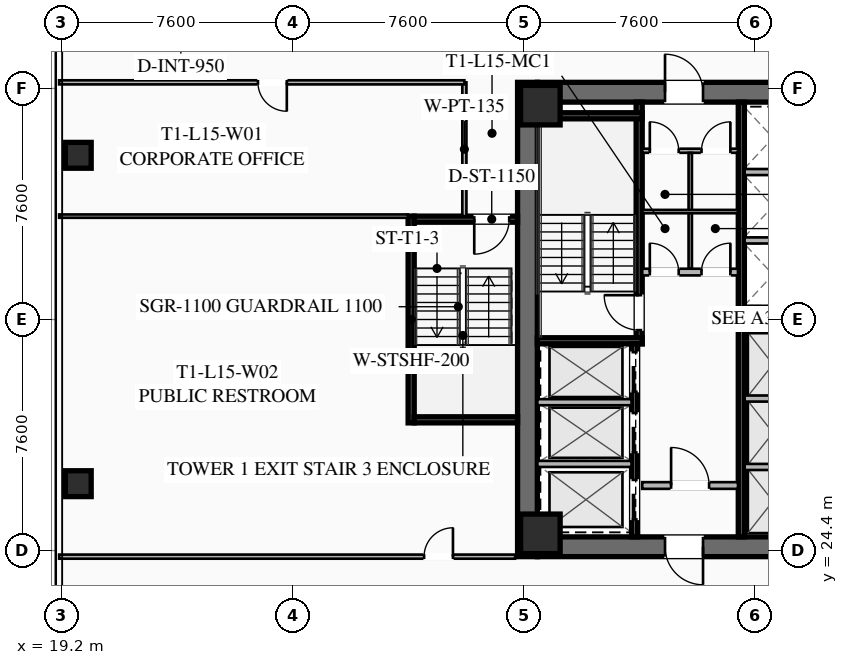
"""IFC4 building model, lengths in metres.
Left out: names, types, materials, properties, quantities, classifications, styles, units other than length and angle.
Written with IfcOpenShell. Run it as: python <this file> out.ifc"""

import sys

from ifc_helpers import new_model, si_unit, direction, frame, frame_2d, origin, origin_2d, place, context, subcontext, project, spatial, rectangle, hollow_rectangle, extrude, element, fill, save


model = new_model("IFC4")
c1 = context("Model", 3, precision=1e-05, world=origin(), true_north=direction((0.0, 1.0)))
c2 = subcontext(c1, "Body", "Model", "MODEL_VIEW")
j1 = project(units=[si_unit("LENGTHUNIT", "METRE"), si_unit("PLANEANGLEUNIT", "RADIAN")], contexts=[c1])
p1 = place(None, origin())
s1 = spatial("IfcSite", under=j1, at=p1, CompositionType="ELEMENT")
p2 = place(p1, origin())
s2 = spatial("IfcBuilding", under=s1, at=p2, CompositionType="ELEMENT")
p3 = place(p2, frame((0.0, 0.0, 60.1)))
s3 = spatial("IfcBuildingStorey", under=s2, at=p3, CompositionType="ELEMENT", Elevation=60.1)
p4 = place(p3, frame((34.525, 24.2, 0.0), z_axis=(0.0, 0.0, 1.0), x_axis=(0.0, 1.0, 0.0)))
e1 = element("IfcWall", 1, at=p4, inside=s3, PredefinedType="SHEAR", context=c2, shape_type="SweptSolid", body=[
    extrude(rectangle(XDim=15.6, YDim=0.65, at=frame_2d((7.8, 0.0))), origin(), (0.0, 0.0, 1.0), 3.55),
])
p5 = place(p3, frame((49.15, 24.525, 0.0), z_axis=(0.0, 0.0, 1.0), x_axis=(-1.0, 0.0, 0.0)))
e2 = element("IfcWall", 2, at=p5, inside=s3, PredefinedType="SHEAR", context=c2, shape_type="SweptSolid", body=[
    extrude(rectangle(XDim=14.3, YDim=0.65, at=frame_2d((7.15, 0.0))), origin(), (0.0, 0.0, 1.0), 3.55),
])
p6 = place(p5, frame((8.85, 0.0, 0.0)))
e3 = element("IfcOpeningElement", 3, at=p6, cuts=e2, PredefinedType="OPENING", context=c2, shape_type="SweptSolid", body=[
    extrude(rectangle(XDim=1.25, YDim=2.25, at=frame_2d((0.625, 1.125))), frame((0.0, 0.335, 0.0), z_axis=(0.0, -1.0, 0.0), x_axis=(1.0, 0.0, 0.0)), (0.0, 0.0, 1.0), 0.67),
])
p7 = place(p5, frame((3.8, 0.0, 0.0)))
e4 = element("IfcOpeningElement", 4, at=p7, cuts=e2, PredefinedType="OPENING", context=c2, shape_type="SweptSolid", body=[
    extrude(rectangle(XDim=1.25, YDim=2.25, at=frame_2d((0.625, 1.125))), frame((0.0, 0.335, 0.0), z_axis=(0.0, -1.0, 0.0), x_axis=(1.0, 0.0, 0.0)), (0.0, 0.0, 1.0), 0.67),
])
p8 = place(p3, frame((34.85, 39.475, 0.0), z_axis=(0.0, 0.0, 1.0), x_axis=(1.0, 0.0, 0.0)))
e5 = element("IfcWall", 5, at=p8, inside=s3, PredefinedType="SHEAR", context=c2, shape_type="SweptSolid", body=[
    extrude(rectangle(XDim=14.3, YDim=0.65, at=frame_2d((7.15, 0.0))), origin(), (0.0, 0.0, 1.0), 3.55),
])
p9 = place(p8, frame((4.2, 0.0, 0.0)))
e6 = element("IfcOpeningElement", 6, at=p9, cuts=e5, PredefinedType="OPENING", context=c2, shape_type="SweptSolid", body=[
    extrude(rectangle(XDim=1.25, YDim=2.25, at=frame_2d((0.625, 1.125))), frame((0.0, 0.335, 0.0), z_axis=(0.0, -1.0, 0.0), x_axis=(1.0, 0.0, 0.0)), (0.0, 0.0, 1.0), 0.67),
])
p10 = place(p8, frame((9.25, 0.0, 0.0)))
e7 = element("IfcOpeningElement", 7, at=p10, cuts=e5, PredefinedType="OPENING", context=c2, shape_type="SweptSolid", body=[
    extrude(rectangle(XDim=1.25, YDim=2.25, at=frame_2d((0.625, 1.125))), frame((0.0, 0.335, 0.0), z_axis=(0.0, -1.0, 0.0), x_axis=(1.0, 0.0, 0.0)), (0.0, 0.0, 1.0), 0.67),
])
for number, where, z_axis, x_axis in (
    (8, (34.95, 24.95, 0.0), (0.0, 0.0, 1.0), (1.0, 0.0, 0.0)),
    (9, (34.95, 39.05, 0.0), (0.0, 0.0, 1.0), (1.0, 0.0, 0.0)),
):
    element("IfcColumn", number, at=place(p3, frame(where, z_axis=z_axis, x_axis=x_axis)), inside=s3, PredefinedType="COLUMN", context=c2, shape_type="SweptSolid", body=[
        extrude(hollow_rectangle(XDim=1.3, YDim=1.3, WallThickness=0.05, at=origin_2d()), origin(), (0.0, 0.0, 1.0), 3.35),
    ])
for number, where, z_axis, x_axis in (
    (10, (19.75, 37.4, 0.0), (0.0, 0.0, 1.0), (1.0, 0.0, 0.0)),
    (11, (19.75, 26.6, 0.0), (0.0, 0.0, 1.0), (1.0, 0.0, 0.0)),
):
    element("IfcColumn", number, at=place(p3, frame(where, z_axis=z_axis, x_axis=x_axis)), inside=s3, PredefinedType="COLUMN", context=c2, shape_type="SweptSolid", body=[
        extrude(hollow_rectangle(XDim=0.85, YDim=0.85, WallThickness=0.035, at=origin_2d()), origin(), (0.0, 0.0, 1.0), 3.35),
    ])
p11 = place(p3, frame((38.2, 31.2, 0.0), z_axis=(0.0, 0.0, 1.0), x_axis=(0.0, 1.0, 0.0)))
e12 = element("IfcWall", 12, at=p11, inside=s3, PredefinedType="SHEAR", context=c2, shape_type="SweptSolid", body=[
    extrude(rectangle(XDim=7.95, YDim=0.2, at=frame_2d((3.975, 0.0))), origin(), (0.0, 0.0, 1.0), 3.35),
])
p12 = place(p11, frame((0.45, 0.0, 0.0)))
e13 = element("IfcOpeningElement", 13, at=p12, cuts=e12, PredefinedType="OPENING", context=c2, shape_type="SweptSolid", body=[
    extrude(rectangle(XDim=1.15, YDim=2.2, at=frame_2d((0.575, 1.1))), frame((0.0, 0.11, 0.0), z_axis=(0.0, -1.0, 0.0), x_axis=(1.0, 0.0, 0.0)), (0.0, 0.0, 1.0), 0.22),
])
for number, where, z_axis, x_axis in (
    (14, (34.85, 31.3, 0.0), (0.0, 0.0, 1.0), (1.0, 0.0, 0.0)),
    (15, (34.85, 38.7, 0.0), (0.0, 0.0, 1.0), (1.0, 0.0, 0.0)),
):
    element("IfcWall", number, at=place(p3, frame(where, z_axis=z_axis, x_axis=x_axis)), inside=s3, PredefinedType="SHEAR", context=c2, shape_type="SweptSolid", body=[
        extrude(rectangle(XDim=3.45, YDim=0.2, at=frame_2d((1.725, 0.0))), origin(), (0.0, 0.0, 1.0), 3.35),
    ])
p13 = place(p3, frame((41.56, 24.85, 0.0), z_axis=(0.0, 0.0, 1.0), x_axis=(0.0, 1.0, 0.0)))
e16 = element("IfcWall", 16, at=p13, inside=s3, PredefinedType="SHEAR", context=c2, shape_type="SweptSolid", body=[
    extrude(rectangle(XDim=14.3, YDim=0.2, at=frame_2d((7.15, 0.0))), origin(), (0.0, 0.0, 1.0), 3.35),
])
p14 = place(p3, frame((38.3, 33.56, 0.0), z_axis=(0.0, 0.0, 1.0), x_axis=(1.0, 0.0, 0.0)))
e17 = element("IfcWall", 17, at=p14, inside=s3, PredefinedType="SOLIDWALL", context=c2, shape_type="SweptSolid", body=[
    extrude(rectangle(XDim=3.15, YDim=0.22, at=frame_2d((1.575, 0.0))), origin(), (0.0, 0.0, 1.0), 2.703),
])
p15 = place(p14, frame((0.25, 0.0, 0.0)))
e18 = element("IfcOpeningElement", 18, at=p15, cuts=e17, PredefinedType="OPENING", context=c2, shape_type="SweptSolid", body=[
    extrude(rectangle(XDim=0.95, YDim=2.05, at=frame_2d((0.475, 1.025))), frame((0.0, 0.12, 0.0), z_axis=(0.0, -1.0, 0.0), x_axis=(1.0, 0.0, 0.0)), (0.0, 0.0, 1.0), 0.24),
])
p16 = place(p14, frame((1.95, 0.0, 0.0)))
e19 = element("IfcOpeningElement", 19, at=p16, cuts=e17, PredefinedType="OPENING", context=c2, shape_type="SweptSolid", body=[
    extrude(rectangle(XDim=0.95, YDim=2.05, at=frame_2d((0.475, 1.025))), frame((0.0, 0.12, 0.0), z_axis=(0.0, -1.0, 0.0), x_axis=(1.0, 0.0, 0.0)), (0.0, 0.0, 1.0), 0.24),
])
p17 = place(p3, frame((38.3, 26.54, 0.0), z_axis=(0.0, 0.0, 1.0), x_axis=(1.0, 0.0, 0.0)))
e20 = element("IfcWall", 20, at=p17, inside=s3, PredefinedType="SOLIDWALL", context=c2, shape_type="SweptSolid", body=[
    extrude(rectangle(XDim=3.15, YDim=0.22, at=frame_2d((1.575, 0.0))), origin(), (0.0, 0.0, 1.0), 2.703),
])
p18 = place(p17, frame((0.95, 0.0, 0.0)))
e21 = element("IfcOpeningElement", 21, at=p18, cuts=e20, PredefinedType="OPENING", context=c2, shape_type="SweptSolid", body=[
    extrude(rectangle(XDim=1.25, YDim=2.25, at=frame_2d((0.625, 1.125))), frame((0.0, 0.12, 0.0), z_axis=(0.0, -1.0, 0.0), x_axis=(1.0, 0.0, 0.0)), (0.0, 0.0, 1.0), 0.24),
])
p19 = place(p3, frame((38.05, 24.85, 0.0), z_axis=(0.0, 0.0, 1.0), x_axis=(0.0, 1.0, 0.0)))
e22 = element("IfcWall", 22, at=p19, inside=s3, PredefinedType="SHEAR", context=c2, shape_type="SweptSolid", body=[
    extrude(rectangle(XDim=6.35, YDim=0.2, at=frame_2d((3.175, 0.0))), origin(), (0.0, 0.0, 1.0), 3.35),
])
p20 = place(p19, frame((4.775, 0.0, 0.0)))
e23 = element("IfcOpeningElement", 23, at=p20, cuts=e22, PredefinedType="OPENING", context=c2, shape_type="SweptSolid", body=[
    extrude(rectangle(XDim=1.3, YDim=2.25, at=frame_2d((0.65, 1.125))), frame((0.0, 0.11, 0.0), z_axis=(0.0, -1.0, 0.0), x_axis=(1.0, 0.0, 0.0)), (0.0, 0.0, 1.0), 0.22),
])
p21 = place(p19, frame((2.775, 0.0, 0.0)))
e24 = element("IfcOpeningElement", 24, at=p21, cuts=e22, PredefinedType="OPENING", context=c2, shape_type="SweptSolid", body=[
    extrude(rectangle(XDim=1.3, YDim=2.25, at=frame_2d((0.65, 1.125))), frame((0.0, 0.11, 0.0), z_axis=(0.0, -1.0, 0.0), x_axis=(1.0, 0.0, 0.0)), (0.0, 0.0, 1.0), 0.22),
])
p22 = place(p19, frame((0.575, 0.0, 0.0)))
e25 = element("IfcOpeningElement", 25, at=p22, cuts=e22, PredefinedType="OPENING", context=c2, shape_type="SweptSolid", body=[
    extrude(rectangle(XDim=1.3, YDim=2.25, at=frame_2d((0.65, 1.125))), frame((0.0, 0.11, 0.0), z_axis=(0.0, -1.0, 0.0), x_axis=(1.0, 0.0, 0.0)), (0.0, 0.0, 1.0), 0.22),
])
for number, where, z_axis, x_axis in (
    (26, (34.85, 27.25, 0.0), (0.0, 0.0, 1.0), (1.0, 0.0, 0.0)),
    (27, (34.85, 29.28, 0.0), (0.0, 0.0, 1.0), (1.0, 0.0, 0.0)),
):
    element("IfcWall", number, at=place(p3, frame(where, z_axis=z_axis, x_axis=x_axis)), inside=s3, PredefinedType="SOLIDWALL", context=c2, shape_type="SweptSolid", body=[
        extrude(rectangle(XDim=3.1, YDim=0.2, at=frame_2d((1.55, 0.0))), origin(), (0.0, 0.0, 1.0), 3.35),
    ])
p23 = place(p3, frame((38.3, 37.55, 0.0), z_axis=(0.0, 0.0, 1.0), x_axis=(1.0, 0.0, 0.0)))
e28 = element("IfcWall", 28, at=p23, inside=s3, PredefinedType="PARTITIONING", context=c2, shape_type="SweptSolid", body=[
    extrude(rectangle(XDim=3.15, YDim=0.135, at=frame_2d((1.575, 0.0))), origin(), (0.0, 0.0, 1.0), 2.703),
])
p24 = place(p23, frame((0.25, 0.0, 0.0)))
e29 = element("IfcOpeningElement", 29, at=p24, cuts=e28, PredefinedType="OPENING", context=c2, shape_type="SweptSolid", body=[
    extrude(rectangle(XDim=0.95, YDim=2.05, at=frame_2d((0.475, 1.025))), frame((0.0, 0.077, 0.0), z_axis=(0.0, -1.0, 0.0), x_axis=(1.0, 0.0, 0.0)), (0.0, 0.0, 1.0), 0.155),
])
p25 = place(p23, frame((1.95, 0.0, 0.0)))
e30 = element("IfcOpeningElement", 30, at=p25, cuts=e28, PredefinedType="OPENING", context=c2, shape_type="SweptSolid", body=[
    extrude(rectangle(XDim=0.95, YDim=2.05, at=frame_2d((0.475, 1.025))), frame((0.0, 0.077, 0.0), z_axis=(0.0, -1.0, 0.0), x_axis=(1.0, 0.0, 0.0)), (0.0, 0.0, 1.0), 0.155),
])
p26 = place(p3, frame((39.88, 33.68, 0.0), z_axis=(0.0, 0.0, 1.0), x_axis=(0.0, 1.0, 0.0)))
e31 = element("IfcWall", 31, at=p26, inside=s3, PredefinedType="PARTITIONING", context=c2, shape_type="SweptSolid", body=[
    extrude(rectangle(XDim=3.8, YDim=0.11, at=frame_2d((1.9, 0.0))), origin(), (0.0, 0.0, 1.0), 2.703),
])
p27 = place(p3, frame((38.3, 35.55, 0.0), z_axis=(0.0, 0.0, 1.0), x_axis=(1.0, 0.0, 0.0)))
e32 = element("IfcWall", 32, at=p27, inside=s3, PredefinedType="PARTITIONING", context=c2, shape_type="SweptSolid", body=[
    extrude(rectangle(XDim=3.15, YDim=0.11, at=frame_2d((1.575, 0.0))), origin(), (0.0, 0.0, 1.0), 2.703),
])
for number, where, z_axis, x_axis in (
    (33, (41.67, 27.15, 0.0), (0.0, 0.0, 1.0), (1.0, 0.0, 0.0)),
    (34, (41.67, 29.4, 0.0), (0.0, 0.0, 1.0), (1.0, 0.0, 0.0)),
    (35, (41.67, 31.65, 0.0), (0.0, 0.0, 1.0), (1.0, 0.0, 0.0)),
    (36, (41.67, 32.35, 0.0), (0.0, 0.0, 1.0), (1.0, 0.0, 0.0)),
    (37, (41.67, 34.6, 0.0), (0.0, 0.0, 1.0), (1.0, 0.0, 0.0)),
    (38, (41.67, 36.85, 0.0), (0.0, 0.0, 1.0), (1.0, 0.0, 0.0)),
):
    element("IfcWall", number, at=place(p3, frame(where, z_axis=z_axis, x_axis=x_axis)), inside=s3, PredefinedType="SOLIDWALL", context=c2, shape_type="SweptSolid", body=[
        extrude(rectangle(XDim=1.88, YDim=0.2, at=frame_2d((0.94, 0.0))), origin(), (0.0, 0.0, 1.0), 3.35),
    ])
p28 = place(p3, frame((30.7, 28.6, 0.0), z_axis=(0.0, 0.0, 1.0), x_axis=(0.0, 1.0, 0.0)))
e39 = element("IfcWall", 39, at=p28, inside=s3, PredefinedType="SHEAR", context=c2, shape_type="SweptSolid", body=[
    extrude(rectangle(XDim=6.8, YDim=0.2, at=frame_2d((3.4, 0.0))), origin(), (0.0, 0.0, 1.0), 3.35),
])
p29 = place(p3, frame((34.2, 35.3, 0.0), z_axis=(0.0, 0.0, 1.0), x_axis=(-1.0, 0.0, 0.0)))
e40 = element("IfcWall", 40, at=p29, inside=s3, PredefinedType="SHEAR", context=c2, shape_type="SweptSolid", body=[
    extrude(rectangle(XDim=3.4, YDim=0.2, at=frame_2d((1.7, 0.0))), origin(), (0.0, 0.0, 1.0), 3.35),
])
p30 = place(p29, frame((0.275, 0.0, 0.0)))
e41 = element("IfcOpeningElement", 41, at=p30, cuts=e40, PredefinedType="OPENING", context=c2, shape_type="SweptSolid", body=[
    extrude(rectangle(XDim=1.15, YDim=2.2, at=frame_2d((0.575, 1.1))), frame((0.0, 0.11, 0.0), z_axis=(0.0, -1.0, 0.0), x_axis=(1.0, 0.0, 0.0)), (0.0, 0.0, 1.0), 0.22),
])
p31 = place(p3, frame((30.8, 28.7, 0.0), z_axis=(0.0, 0.0, 1.0), x_axis=(1.0, 0.0, 0.0)))
e42 = element("IfcWall", 42, at=p31, inside=s3, PredefinedType="SHEAR", context=c2, shape_type="SweptSolid", body=[
    extrude(rectangle(XDim=3.4, YDim=0.2, at=frame_2d((1.7, 0.0))), origin(), (0.0, 0.0, 1.0), 3.35),
])
p32 = place(p3, frame((32.45, 35.4, 0.0), z_axis=(0.0, 0.0, 1.0), x_axis=(0.0, 1.0, 0.0)))
e43 = element("IfcWall", 43, at=p32, inside=s3, PredefinedType="PARTITIONING", context=c2, shape_type="SweptSolid", body=[
    extrude(rectangle(XDim=4.4, YDim=0.135, at=frame_2d((2.2, 0.0))), origin(), (0.0, 0.0, 1.0), 2.703),
])
p33 = place(p3, frame((32.45, 39.8, 0.0), z_axis=(0.0, 0.0, 1.0), x_axis=(-1.0, 0.0, 0.0)))
e44 = element("IfcWall", 44, at=p33, inside=s3, PredefinedType="PARTITIONING", context=c2, shape_type="SweptSolid", body=[
    extrude(rectangle(XDim=13.33, YDim=0.135, at=frame_2d((6.665, 0.0))), origin(), (0.0, 0.0, 1.0), 2.703),
])
p34 = place(p33, frame((5.84, 0.0, 0.0)))
e45 = element("IfcOpeningElement", 45, at=p34, cuts=e44, PredefinedType="OPENING", context=c2, shape_type="SweptSolid", body=[
    extrude(rectangle(XDim=0.95, YDim=2.05, at=frame_2d((0.475, 1.025))), frame((0.0, 0.077, 0.0), z_axis=(0.0, -1.0, 0.0), x_axis=(1.0, 0.0, 0.0)), (0.0, 0.0, 1.0), 0.155),
])
p35 = place(p3, frame((19.12, 24.2, 0.0), z_axis=(0.0, 0.0, 1.0), x_axis=(1.0, 0.0, 0.0)))
e46 = element("IfcWall", 46, at=p35, inside=s3, PredefinedType="PARTITIONING", context=c2, shape_type="SweptSolid", body=[
    extrude(rectangle(XDim=15.0, YDim=0.135, at=frame_2d((7.5, 0.0))), origin(), (0.0, 0.0, 1.0), 2.703),
])
p36 = place(p35, frame((12.005, 0.0, 0.0)))
e47 = element("IfcOpeningElement", 47, at=p36, cuts=e46, PredefinedType="OPENING", context=c2, shape_type="SweptSolid", body=[
    extrude(rectangle(XDim=0.95, YDim=2.05, at=frame_2d((0.475, 1.025))), frame((0.0, 0.077, 0.0), z_axis=(0.0, -1.0, 0.0), x_axis=(1.0, 0.0, 0.0)), (0.0, 0.0, 1.0), 0.155),
])
p37 = place(p3, frame((30.6, 35.4, 0.0), z_axis=(0.0, 0.0, 1.0), x_axis=(-1.0, 0.0, 0.0)))
e48 = element("IfcWall", 48, at=p37, inside=s3, PredefinedType="PARTITIONING", context=c2, shape_type="SweptSolid", body=[
    extrude(rectangle(XDim=11.48, YDim=0.11, at=frame_2d((5.74, 0.0))), origin(), (0.0, 0.0, 1.0), 2.703),
])
p38 = place(p9, origin())
e49 = element("IfcDoor", 49, at=p38, inside=s3, OperationType="SINGLE_SWING_LEFT", PredefinedType="DOOR", context=c2, shape_type="SweptSolid", body=[
    extrude(rectangle(XDim=1.25, YDim=2.25, at=frame_2d((0.625, 1.125))), frame((0.0, 0.025, 0.0), z_axis=(0.0, -1.0, 0.0), x_axis=(1.0, 0.0, 0.0)), (0.0, 0.0, 1.0), 0.05),
])
fill(e6, e49)
p39 = place(p6, origin())
e50 = element("IfcDoor", 50, at=p39, inside=s3, OperationType="SINGLE_SWING_LEFT", PredefinedType="DOOR", context=c2, shape_type="SweptSolid", body=[
    extrude(rectangle(XDim=1.25, YDim=2.25, at=frame_2d((0.625, 1.125))), frame((0.0, 0.025, 0.0), z_axis=(0.0, -1.0, 0.0), x_axis=(1.0, 0.0, 0.0)), (0.0, 0.0, 1.0), 0.05),
])
fill(e3, e50)
p40 = place(p12, origin())
e51 = element("IfcDoor", 51, at=p40, inside=s3, OperationType="SINGLE_SWING_RIGHT", PredefinedType="DOOR", context=c2, shape_type="SweptSolid", body=[
    extrude(rectangle(XDim=1.15, YDim=2.2, at=frame_2d((0.575, 1.1))), frame((0.0, 0.025, 0.0), z_axis=(0.0, -1.0, 0.0), x_axis=(1.0, 0.0, 0.0)), (0.0, 0.0, 1.0), 0.05),
])
fill(e13, e51)
p41 = place(p18, origin())
e52 = element("IfcDoor", 52, at=p41, inside=s3, OperationType="SINGLE_SWING_LEFT", PredefinedType="DOOR", context=c2, shape_type="SweptSolid", body=[
    extrude(rectangle(XDim=1.25, YDim=2.25, at=frame_2d((0.625, 1.125))), frame((0.0, 0.025, 0.0), z_axis=(0.0, -1.0, 0.0), x_axis=(1.0, 0.0, 0.0)), (0.0, 0.0, 1.0), 0.05),
])
fill(e21, e52)
p42 = place(p24, origin())
e53 = element("IfcDoor", 53, at=p42, inside=s3, OperationType="SINGLE_SWING_LEFT", PredefinedType="DOOR", context=c2, shape_type="SweptSolid", body=[
    extrude(rectangle(XDim=0.95, YDim=2.05, at=frame_2d((0.475, 1.025))), frame((0.0, 0.025, 0.0), z_axis=(0.0, -1.0, 0.0), x_axis=(1.0, 0.0, 0.0)), (0.0, 0.0, 1.0), 0.05),
])
fill(e29, e53)
p43 = place(p25, origin())
e54 = element("IfcDoor", 54, at=p43, inside=s3, OperationType="SINGLE_SWING_RIGHT", PredefinedType="DOOR", context=c2, shape_type="SweptSolid", body=[
    extrude(rectangle(XDim=0.95, YDim=2.05, at=frame_2d((0.475, 1.025))), frame((0.0, 0.025, 0.0), z_axis=(0.0, -1.0, 0.0), x_axis=(1.0, 0.0, 0.0)), (0.0, 0.0, 1.0), 0.05),
])
fill(e30, e54)
p44 = place(p15, origin())
e55 = element("IfcDoor", 55, at=p44, inside=s3, OperationType="SINGLE_SWING_LEFT", PredefinedType="DOOR", context=c2, shape_type="SweptSolid", body=[
    extrude(rectangle(XDim=0.95, YDim=2.05, at=frame_2d((0.475, 1.025))), frame((0.0, 0.025, 0.0), z_axis=(0.0, -1.0, 0.0), x_axis=(1.0, 0.0, 0.0)), (0.0, 0.0, 1.0), 0.05),
])
fill(e18, e55)
p45 = place(p16, origin())
e56 = element("IfcDoor", 56, at=p45, inside=s3, OperationType="SINGLE_SWING_RIGHT", PredefinedType="DOOR", context=c2, shape_type="SweptSolid", body=[
    extrude(rectangle(XDim=0.95, YDim=2.05, at=frame_2d((0.475, 1.025))), frame((0.0, 0.025, 0.0), z_axis=(0.0, -1.0, 0.0), x_axis=(1.0, 0.0, 0.0)), (0.0, 0.0, 1.0), 0.05),
])
fill(e19, e56)
p46 = place(p30, origin())
e57 = element("IfcDoor", 57, at=p46, inside=s3, OperationType="SINGLE_SWING_RIGHT", PredefinedType="DOOR", context=c2, shape_type="SweptSolid", body=[
    extrude(rectangle(XDim=1.15, YDim=2.2, at=frame_2d((0.575, 1.1))), frame((0.0, 0.025, 0.0), z_axis=(0.0, -1.0, 0.0), x_axis=(1.0, 0.0, 0.0)), (0.0, 0.0, 1.0), 0.05),
])
fill(e41, e57)
p47 = place(p34, origin())
e58 = element("IfcDoor", 58, at=p47, inside=s3, OperationType="SINGLE_SWING_LEFT", PredefinedType="DOOR", context=c2, shape_type="SweptSolid", body=[
    extrude(rectangle(XDim=0.95, YDim=2.05, at=frame_2d((0.475, 1.025))), frame((0.0, 0.025, 0.0), z_axis=(0.0, -1.0, 0.0), x_axis=(1.0, 0.0, 0.0)), (0.0, 0.0, 1.0), 0.05),
])
fill(e45, e58)
p48 = place(p36, origin())
e59 = element("IfcDoor", 59, at=p48, inside=s3, OperationType="SINGLE_SWING_RIGHT", PredefinedType="DOOR", context=c2, shape_type="SweptSolid", body=[
    extrude(rectangle(XDim=0.95, YDim=2.05, at=frame_2d((0.475, 1.025))), frame((0.0, 0.025, 0.0), z_axis=(0.0, -1.0, 0.0), x_axis=(1.0, 0.0, 0.0)), (0.0, 0.0, 1.0), 0.05),
])
fill(e47, e59)
p49 = place(p20, origin())
e60 = element("IfcDoor", 60, at=p49, inside=s3, OperationType="SLIDING_TO_LEFT", PredefinedType="DOOR", context=c2, shape_type="SweptSolid", body=[
    extrude(rectangle(XDim=1.3, YDim=2.25, at=frame_2d((0.65, 1.125))), frame((0.0, 0.025, 0.0), z_axis=(0.0, -1.0, 0.0), x_axis=(1.0, 0.0, 0.0)), (0.0, 0.0, 1.0), 0.05),
])
fill(e23, e60)
p50 = place(p21, origin())
e61 = element("IfcDoor", 61, at=p50, inside=s3, OperationType="SLIDING_TO_LEFT", PredefinedType="DOOR", context=c2, shape_type="SweptSolid", body=[
    extrude(rectangle(XDim=1.3, YDim=2.25, at=frame_2d((0.65, 1.125))), frame((0.0, 0.025, 0.0), z_axis=(0.0, -1.0, 0.0), x_axis=(1.0, 0.0, 0.0)), (0.0, 0.0, 1.0), 0.05),
])
fill(e24, e61)
p51 = place(p22, origin())
e62 = element("IfcDoor", 62, at=p51, inside=s3, OperationType="SLIDING_TO_LEFT", PredefinedType="DOOR", context=c2, shape_type="SweptSolid", body=[
    extrude(rectangle(XDim=1.3, YDim=2.25, at=frame_2d((0.65, 1.125))), frame((0.0, 0.025, 0.0), z_axis=(0.0, -1.0, 0.0), x_axis=(1.0, 0.0, 0.0)), (0.0, 0.0, 1.0), 0.05),
])
fill(e25, e62)
save(model, sys.argv[1])
